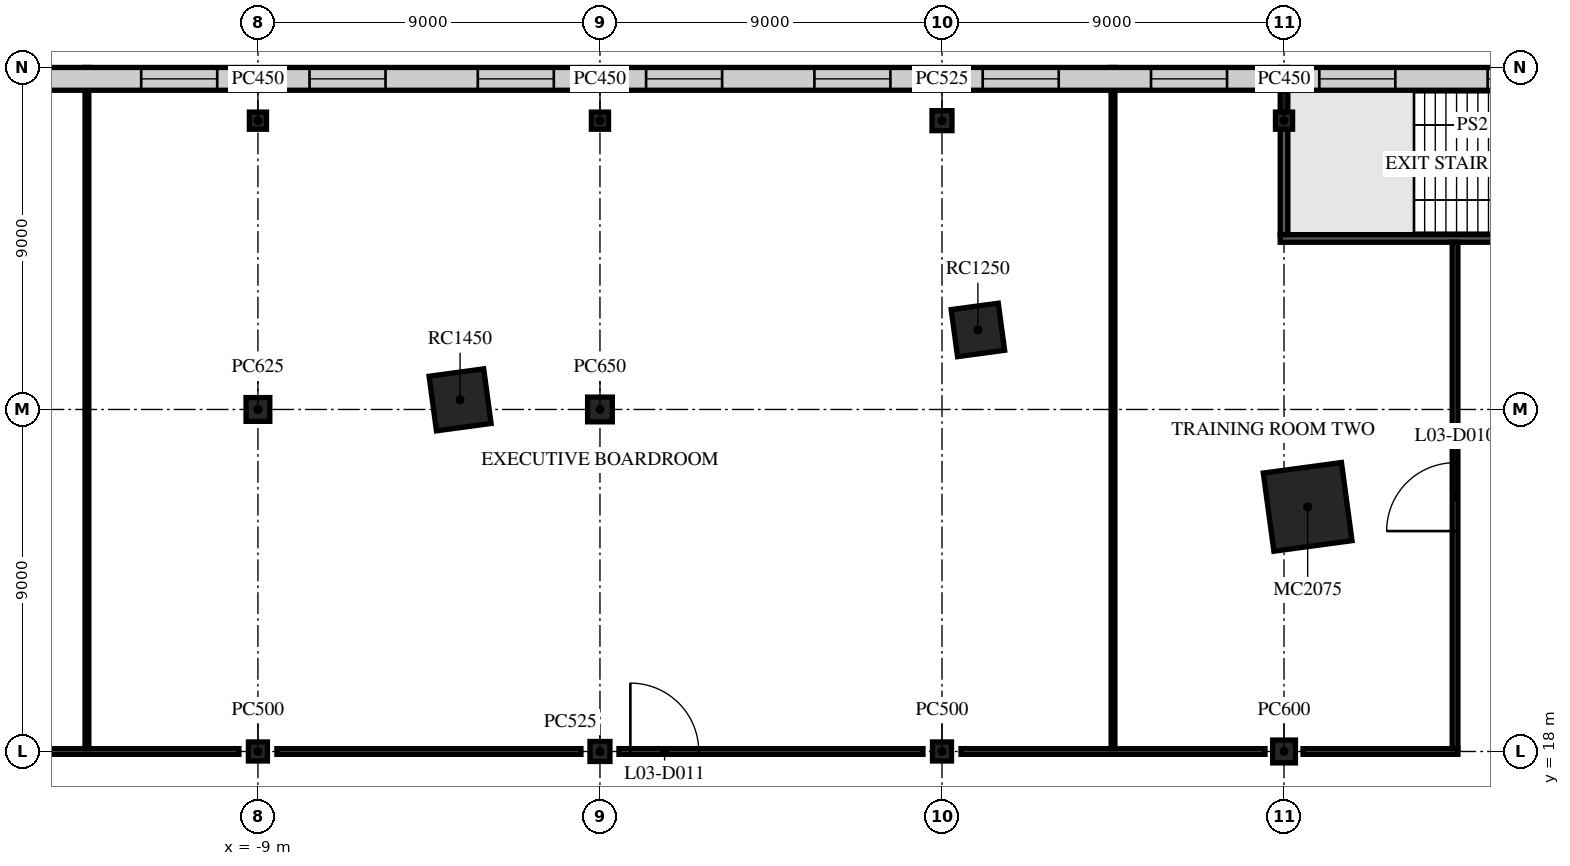
"""IFC4 building model, lengths in metres.
Left out: names, types, materials, properties, quantities, classifications, styles, units other than length and angle.
Written with IfcOpenShell. Run it as: python <this file> out.ifc"""

import sys

from ifc_helpers import new_model, si_unit, direction, frame, frame_2d, origin, origin_2d, place, context, subcontext, project, spatial, rectangle, extrude, element, fill, save


model = new_model("IFC4")
c1 = context("Model", 3, precision=1e-05, world=origin(), true_north=direction((0.0, 1.0)))
c2 = subcontext(c1, "Body", "Model", "MODEL_VIEW")
j1 = project(units=[si_unit("LENGTHUNIT", "METRE"), si_unit("PLANEANGLEUNIT", "RADIAN")], contexts=[c1])
p1 = place(None, origin())
s1 = spatial("IfcSite", under=j1, at=p1, CompositionType="ELEMENT")
p2 = place(p1, origin())
s2 = spatial("IfcBuilding", under=s1, at=p2, CompositionType="ELEMENT")
p3 = place(p2, frame((0.0, 0.0, 13.5)))
s3 = spatial("IfcBuildingStorey", under=s2, at=p3, CompositionType="ELEMENT", Elevation=13.5)
p4 = place(p3, frame((-9.0, 18.0, 0.0), z_axis=(0.0, 0.0, 1.0), x_axis=(1.0, 0.0, 0.0)))
e1 = element("IfcColumn", 1, at=p4, inside=s3, PredefinedType="COLUMN", context=c2, shape_type="SweptSolid", body=[
    extrude(rectangle(XDim=0.5, YDim=0.5, at=origin_2d()), origin(), (0.0, 0.0, 1.0), 4.5),
])
p5 = place(p3, frame((-9.0, 27.0, 0.0), z_axis=(0.0, 0.0, 1.0), x_axis=(1.0, 0.0, 0.0)))
e2 = element("IfcColumn", 2, at=p5, inside=s3, PredefinedType="COLUMN", context=c2, shape_type="SweptSolid", body=[
    extrude(rectangle(XDim=0.625, YDim=0.625, at=origin_2d()), origin(), (0.0, 0.0, 1.0), 4.5),
])
p6 = place(p3, frame((-9.0, 34.6, 0.0), z_axis=(0.0, 0.0, 1.0), x_axis=(1.0, 0.0, 0.0)))
e3 = element("IfcColumn", 3, at=p6, inside=s3, PredefinedType="COLUMN", context=c2, shape_type="SweptSolid", body=[
    extrude(rectangle(XDim=0.45, YDim=0.45, at=origin_2d()), origin(), (0.0, 0.0, 1.0), 4.5),
])
p7 = place(p3, frame((0.0, 18.0, 0.0), z_axis=(0.0, 0.0, 1.0), x_axis=(1.0, 0.0, 0.0)))
e4 = element("IfcColumn", 4, at=p7, inside=s3, PredefinedType="COLUMN", context=c2, shape_type="SweptSolid", body=[
    extrude(rectangle(XDim=0.525, YDim=0.525, at=origin_2d()), origin(), (0.0, 0.0, 1.0), 4.5),
])
p8 = place(p3, frame((0.0, 27.0, 0.0), z_axis=(0.0, 0.0, 1.0), x_axis=(1.0, 0.0, 0.0)))
e5 = element("IfcColumn", 5, at=p8, inside=s3, PredefinedType="COLUMN", context=c2, shape_type="SweptSolid", body=[
    extrude(rectangle(XDim=0.65, YDim=0.65, at=origin_2d()), origin(), (0.0, 0.0, 1.0), 4.5),
])
p9 = place(p3, frame((0.0, 34.6, 0.0), z_axis=(0.0, 0.0, 1.0), x_axis=(1.0, 0.0, 0.0)))
e6 = element("IfcColumn", 6, at=p9, inside=s3, PredefinedType="COLUMN", context=c2, shape_type="SweptSolid", body=[
    extrude(rectangle(XDim=0.45, YDim=0.45, at=origin_2d()), origin(), (0.0, 0.0, 1.0), 4.5),
])
p10 = place(p3, frame((9.0, 18.0, 0.0), z_axis=(0.0, 0.0, 1.0), x_axis=(1.0, 0.0, 0.0)))
e7 = element("IfcColumn", 7, at=p10, inside=s3, PredefinedType="COLUMN", context=c2, shape_type="SweptSolid", body=[
    extrude(rectangle(XDim=0.5, YDim=0.5, at=origin_2d()), origin(), (0.0, 0.0, 1.0), 4.5),
])
p11 = place(p3, frame((9.0, 34.6, 0.0), z_axis=(0.0, 0.0, 1.0), x_axis=(1.0, 0.0, 0.0)))
e8 = element("IfcColumn", 8, at=p11, inside=s3, PredefinedType="COLUMN", context=c2, shape_type="SweptSolid", body=[
    extrude(rectangle(XDim=0.525, YDim=0.525, at=origin_2d()), origin(), (0.0, 0.0, 1.0), 4.5),
])
p12 = place(p3, frame((18.0, 18.0, 0.0), z_axis=(0.0, 0.0, 1.0), x_axis=(1.0, 0.0, 0.0)))
e9 = element("IfcColumn", 9, at=p12, inside=s3, PredefinedType="COLUMN", context=c2, shape_type="SweptSolid", body=[
    extrude(rectangle(XDim=0.6, YDim=0.6, at=origin_2d()), origin(), (0.0, 0.0, 1.0), 4.5),
])
p13 = place(p3, frame((18.0, 34.6, 0.0), z_axis=(0.0, 0.0, 1.0), x_axis=(1.0, 0.0, 0.0)))
e10 = element("IfcColumn", 10, at=p13, inside=s3, PredefinedType="COLUMN", context=c2, shape_type="SweptSolid", body=[
    extrude(rectangle(XDim=0.45, YDim=0.45, at=origin_2d()), origin(), (0.0, 0.0, 1.0), 4.5),
])
p14 = place(p3, frame((18.622, 24.437, 0.0), z_axis=(0.0, 0.0, 1.0), x_axis=(0.991001197216, 0.133853005627, 0.0)))
e11 = element("IfcColumn", 11, at=p14, inside=s3, PredefinedType="COLUMN", context=c2, shape_type="SweptSolid", body=[
    extrude(rectangle(XDim=2.075, YDim=2.075, at=origin_2d()), origin(), (0.0, 0.0, 1.0), 4.5),
])
p15 = place(p3, frame((9.945, 29.093, 0.0), z_axis=(0.0, 0.0, 1.0), x_axis=(0.991001197216, 0.133853005627, 0.0)))
e12 = element("IfcColumn", 12, at=p15, inside=s3, PredefinedType="COLUMN", context=c2, shape_type="SweptSolid", body=[
    extrude(rectangle(XDim=1.25, YDim=1.25, at=origin_2d()), origin(), (0.0, 0.0, 1.0), 4.5),
])
p16 = place(p3, frame((-3.681, 27.253, 0.0), z_axis=(0.0, 0.0, 1.0), x_axis=(0.991001197216, 0.133853005627, 0.0)))
e13 = element("IfcColumn", 13, at=p16, inside=s3, PredefinedType="COLUMN", context=c2, shape_type="SweptSolid", body=[
    extrude(rectangle(XDim=1.45, YDim=1.45, at=origin_2d()), origin(), (0.0, 0.0, 1.0), 4.5),
])
for number, where, z_axis, x_axis in (
    (14, (-17.5, 18.0, 0.0), (0.0, 0.0, 1.0), (1.0, 0.0, 0.0)),
    (15, (-8.5, 18.0, 0.0), (0.0, 0.0, 1.0), (1.0, 0.0, 0.0)),
):
    element("IfcWall", number, at=place(p3, frame(where, z_axis=z_axis, x_axis=x_axis)), inside=s3, PredefinedType="PARTITIONING", context=c2, shape_type="SweptSolid", body=[
        extrude(rectangle(XDim=8.0, YDim=0.15, at=frame_2d((4.0, 0.0))), origin(), (0.0, 0.0, 1.0), 4.1),
    ])
p17 = place(p3, frame((0.5, 18.0, 0.0), z_axis=(0.0, 0.0, 1.0), x_axis=(1.0, 0.0, 0.0)))
e16 = element("IfcWall", 16, at=p17, inside=s3, PredefinedType="PARTITIONING", context=c2, shape_type="SweptSolid", body=[
    extrude(rectangle(XDim=8.0, YDim=0.15, at=frame_2d((4.0, 0.0))), origin(), (0.0, 0.0, 1.0), 4.1),
])
p18 = place(p17, frame((0.3, 0.0, 0.0)))
e17 = element("IfcOpeningElement", 17, at=p18, cuts=e16, PredefinedType="OPENING", context=c2, shape_type="SweptSolid", body=[
    extrude(rectangle(XDim=1.8, YDim=2.1, at=frame_2d((0.9, 1.05))), frame((0.0, 0.085, 0.0), z_axis=(0.0, -1.0, 0.0), x_axis=(1.0, 0.0, 0.0)), (0.0, 0.0, 1.0), 0.17),
])
p19 = place(p3, frame((9.5, 18.0, 0.0), z_axis=(0.0, 0.0, 1.0), x_axis=(1.0, 0.0, 0.0)))
e18 = element("IfcWall", 18, at=p19, inside=s3, PredefinedType="PARTITIONING", context=c2, shape_type="SweptSolid", body=[
    extrude(rectangle(XDim=8.0, YDim=0.15, at=frame_2d((4.0, 0.0))), origin(), (0.0, 0.0, 1.0), 4.1),
])
p20 = place(p3, frame((18.5, 18.0, 0.0), z_axis=(0.0, 0.0, 1.0), x_axis=(1.0, 0.0, 0.0)))
e19 = element("IfcWall", 19, at=p20, inside=s3, PredefinedType="PARTITIONING", context=c2, shape_type="SweptSolid", body=[
    extrude(rectangle(XDim=4.075, YDim=0.15, at=frame_2d((2.038, 0.0))), origin(), (0.0, 0.0, 1.0), 4.1),
])
p21 = place(p3, frame((17.9, 31.5, 0.0), z_axis=(0.0, 0.0, 1.0), x_axis=(1.0, 0.0, 0.0)))
e20 = element("IfcWall", 20, at=p21, inside=s3, PredefinedType="PARTITIONING", context=c2, shape_type="SweptSolid", body=[
    extrude(rectangle(XDim=9.175, YDim=0.2, at=frame_2d((4.587, 0.0))), origin(), (0.0, 0.0, 1.0), 4.1),
])
p22 = place(p21, frame((7.1, 0.0, 0.0)))
e21 = element("IfcOpeningElement", 21, at=p22, cuts=e20, PredefinedType="OPENING", context=c2, shape_type="SweptSolid", body=[
    extrude(rectangle(XDim=1.2, YDim=2.1, at=frame_2d((0.6, 1.05))), frame((0.0, 0.11, 0.0), z_axis=(0.0, -1.0, 0.0), x_axis=(1.0, 0.0, 0.0)), (0.0, 0.0, 1.0), 0.22),
])
for number, where, z_axis, x_axis in (
    (22, (-13.5, 18.075, 0.0), (0.0, 0.0, 1.0), (0.0, 1.0, 0.0)),
    (23, (13.5, 18.075, 0.0), (0.0, 0.0, 1.0), (0.0, 1.0, 0.0)),
):
    element("IfcWall", number, at=place(p3, frame(where, z_axis=z_axis, x_axis=x_axis)), inside=s3, PredefinedType="PARTITIONING", context=c2, shape_type="SweptSolid", body=[
        extrude(rectangle(XDim=17.925, YDim=0.1, at=frame_2d((8.962, 0.0))), origin(), (0.0, 0.0, 1.0), 4.1),
    ])
p23 = place(p3, frame((18.0, 31.6, 0.0), z_axis=(0.0, 0.0, 1.0), x_axis=(0.0, 1.0, 0.0)))
e24 = element("IfcWall", 24, at=p23, inside=s3, PredefinedType="PARTITIONING", context=c2, shape_type="SweptSolid", body=[
    extrude(rectangle(XDim=2.775, YDim=0.2, at=frame_2d((1.387, 0.0))), origin(), (0.0, 0.0, 1.0), 4.1),
])
p24 = place(p3, frame((18.0, 34.825, 0.0), z_axis=(0.0, 0.0, 1.0), x_axis=(0.0, 1.0, 0.0)))
e25 = element("IfcWall", 25, at=p24, inside=s3, PredefinedType="PARTITIONING", context=c2, shape_type="SweptSolid", body=[
    extrude(rectangle(XDim=1.175, YDim=0.2, at=frame_2d((0.587, 0.0))), origin(), (0.0, 0.0, 1.0), 4.1),
])
p25 = place(p3, frame((22.5, 18.075, 0.0), z_axis=(0.0, 0.0, 1.0), x_axis=(0.0, 1.0, 0.0)))
e26 = element("IfcWall", 26, at=p25, inside=s3, PredefinedType="PARTITIONING", context=c2, shape_type="SweptSolid", body=[
    extrude(rectangle(XDim=13.325, YDim=0.15, at=frame_2d((6.663, 0.0))), origin(), (0.0, 0.0, 1.0), 4.1),
])
p26 = place(p25, frame((5.725, 0.0, 0.0)))
e27 = element("IfcOpeningElement", 27, at=p26, cuts=e26, PredefinedType="OPENING", context=c2, shape_type="SweptSolid", body=[
    extrude(rectangle(XDim=1.8, YDim=2.1, at=frame_2d((0.9, 1.05))), frame((0.0, 0.085, 0.0), z_axis=(0.0, -1.0, 0.0), x_axis=(1.0, 0.0, 0.0)), (0.0, 0.0, 1.0), 0.17),
])
p27 = place(p3, frame((30.876, 35.7, 0.0), z_axis=(0.0, 0.0, 1.0), x_axis=(-1.0, 0.0, 0.0)))
e28 = element("IfcWall", 28, at=p27, inside=s3, PredefinedType="STANDARD", context=c2, shape_type="SweptSolid", body=[
    extrude(rectangle(XDim=61.751, YDim=0.6, at=frame_2d((30.876, 0.0))), origin(), (0.0, 0.0, 1.0), 4.1),
])
p28 = place(p27, frame((1.152, 0.0, 0.9)))
e29 = element("IfcOpeningElement", 29, at=p28, cuts=e28, PredefinedType="OPENING", context=c2, shape_type="SweptSolid", body=[
    extrude(rectangle(XDim=2.0, YDim=3.0, at=frame_2d((1.0, 1.5))), frame((0.0, 0.31, 0.0), z_axis=(0.0, -1.0, 0.0), x_axis=(1.0, 0.0, 0.0)), (0.0, 0.0, 1.0), 0.62),
])
p29 = place(p27, frame((5.519, 0.0, 0.9)))
e30 = element("IfcOpeningElement", 30, at=p29, cuts=e28, PredefinedType="OPENING", context=c2, shape_type="SweptSolid", body=[
    extrude(rectangle(XDim=2.0, YDim=3.0, at=frame_2d((1.0, 1.5))), frame((0.0, 0.31, 0.0), z_axis=(0.0, -1.0, 0.0), x_axis=(1.0, 0.0, 0.0)), (0.0, 0.0, 1.0), 0.62),
])
p30 = place(p27, frame((9.947, 0.0, 0.9)))
e31 = element("IfcOpeningElement", 31, at=p30, cuts=e28, PredefinedType="OPENING", context=c2, shape_type="SweptSolid", body=[
    extrude(rectangle(XDim=2.0, YDim=3.0, at=frame_2d((1.0, 1.5))), frame((0.0, 0.31, 0.0), z_axis=(0.0, -1.0, 0.0), x_axis=(1.0, 0.0, 0.0)), (0.0, 0.0, 1.0), 0.62),
])
p31 = place(p27, frame((14.376, 0.0, 0.9)))
e32 = element("IfcOpeningElement", 32, at=p31, cuts=e28, PredefinedType="OPENING", context=c2, shape_type="SweptSolid", body=[
    extrude(rectangle(XDim=2.0, YDim=3.0, at=frame_2d((1.0, 1.5))), frame((0.0, 0.31, 0.0), z_axis=(0.0, -1.0, 0.0), x_axis=(1.0, 0.0, 0.0)), (0.0, 0.0, 1.0), 0.62),
])
p32 = place(p27, frame((18.804, 0.0, 0.9)))
e33 = element("IfcOpeningElement", 33, at=p32, cuts=e28, PredefinedType="OPENING", context=c2, shape_type="SweptSolid", body=[
    extrude(rectangle(XDim=2.0, YDim=3.0, at=frame_2d((1.0, 1.5))), frame((0.0, 0.31, 0.0), z_axis=(0.0, -1.0, 0.0), x_axis=(1.0, 0.0, 0.0)), (0.0, 0.0, 1.0), 0.62),
])
p33 = place(p27, frame((23.233, 0.0, 0.9)))
e34 = element("IfcOpeningElement", 34, at=p33, cuts=e28, PredefinedType="OPENING", context=c2, shape_type="SweptSolid", body=[
    extrude(rectangle(XDim=2.0, YDim=3.0, at=frame_2d((1.0, 1.5))), frame((0.0, 0.31, 0.0), z_axis=(0.0, -1.0, 0.0), x_axis=(1.0, 0.0, 0.0)), (0.0, 0.0, 1.0), 0.62),
])
p34 = place(p27, frame((27.662, 0.0, 0.9)))
e35 = element("IfcOpeningElement", 35, at=p34, cuts=e28, PredefinedType="OPENING", context=c2, shape_type="SweptSolid", body=[
    extrude(rectangle(XDim=2.0, YDim=3.0, at=frame_2d((1.0, 1.5))), frame((0.0, 0.31, 0.0), z_axis=(0.0, -1.0, 0.0), x_axis=(1.0, 0.0, 0.0)), (0.0, 0.0, 1.0), 0.62),
])
p35 = place(p27, frame((32.09, 0.0, 0.9)))
e36 = element("IfcOpeningElement", 36, at=p35, cuts=e28, PredefinedType="OPENING", context=c2, shape_type="SweptSolid", body=[
    extrude(rectangle(XDim=2.0, YDim=3.0, at=frame_2d((1.0, 1.5))), frame((0.0, 0.31, 0.0), z_axis=(0.0, -1.0, 0.0), x_axis=(1.0, 0.0, 0.0)), (0.0, 0.0, 1.0), 0.62),
])
p36 = place(p27, frame((36.519, 0.0, 0.9)))
e37 = element("IfcOpeningElement", 37, at=p36, cuts=e28, PredefinedType="OPENING", context=c2, shape_type="SweptSolid", body=[
    extrude(rectangle(XDim=2.0, YDim=3.0, at=frame_2d((1.0, 1.5))), frame((0.0, 0.31, 0.0), z_axis=(0.0, -1.0, 0.0), x_axis=(1.0, 0.0, 0.0)), (0.0, 0.0, 1.0), 0.62),
])
p37 = place(p27, frame((40.947, 0.0, 0.9)))
e38 = element("IfcOpeningElement", 38, at=p37, cuts=e28, PredefinedType="OPENING", context=c2, shape_type="SweptSolid", body=[
    extrude(rectangle(XDim=2.0, YDim=3.0, at=frame_2d((1.0, 1.5))), frame((0.0, 0.31, 0.0), z_axis=(0.0, -1.0, 0.0), x_axis=(1.0, 0.0, 0.0)), (0.0, 0.0, 1.0), 0.62),
])
p38 = place(p27, frame((45.376, 0.0, 0.9)))
e39 = element("IfcOpeningElement", 39, at=p38, cuts=e28, PredefinedType="OPENING", context=c2, shape_type="SweptSolid", body=[
    extrude(rectangle(XDim=2.0, YDim=3.0, at=frame_2d((1.0, 1.5))), frame((0.0, 0.31, 0.0), z_axis=(0.0, -1.0, 0.0), x_axis=(1.0, 0.0, 0.0)), (0.0, 0.0, 1.0), 0.62),
])
p39 = place(p27, frame((49.804, 0.0, 0.9)))
e40 = element("IfcOpeningElement", 40, at=p39, cuts=e28, PredefinedType="OPENING", context=c2, shape_type="SweptSolid", body=[
    extrude(rectangle(XDim=2.0, YDim=3.0, at=frame_2d((1.0, 1.5))), frame((0.0, 0.31, 0.0), z_axis=(0.0, -1.0, 0.0), x_axis=(1.0, 0.0, 0.0)), (0.0, 0.0, 1.0), 0.62),
])
p40 = place(p27, frame((54.233, 0.0, 0.9)))
e41 = element("IfcOpeningElement", 41, at=p40, cuts=e28, PredefinedType="OPENING", context=c2, shape_type="SweptSolid", body=[
    extrude(rectangle(XDim=2.0, YDim=3.0, at=frame_2d((1.0, 1.5))), frame((0.0, 0.31, 0.0), z_axis=(0.0, -1.0, 0.0), x_axis=(1.0, 0.0, 0.0)), (0.0, 0.0, 1.0), 0.62),
])
p41 = place(p27, frame((58.599, 0.0, 0.9)))
e42 = element("IfcOpeningElement", 42, at=p41, cuts=e28, PredefinedType="OPENING", context=c2, shape_type="SweptSolid", body=[
    extrude(rectangle(XDim=2.0, YDim=3.0, at=frame_2d((1.0, 1.5))), frame((0.0, 0.31, 0.0), z_axis=(0.0, -1.0, 0.0), x_axis=(1.0, 0.0, 0.0)), (0.0, 0.0, 1.0), 0.62),
])
p42 = place(p26, origin())
e43 = element("IfcDoor", 43, at=p42, inside=s3, OperationType="DOUBLE_DOOR_SINGLE_SWING", PredefinedType="DOOR", context=c2, shape_type="SweptSolid", body=[
    extrude(rectangle(XDim=1.8, YDim=2.1, at=frame_2d((0.9, 1.05))), frame((0.0, 0.025, 0.0), z_axis=(0.0, -1.0, 0.0), x_axis=(1.0, 0.0, 0.0)), (0.0, 0.0, 1.0), 0.05),
])
fill(e27, e43)
p43 = place(p18, origin())
e44 = element("IfcDoor", 44, at=p43, inside=s3, OperationType="DOUBLE_DOOR_SINGLE_SWING", PredefinedType="DOOR", context=c2, shape_type="SweptSolid", body=[
    extrude(rectangle(XDim=1.8, YDim=2.1, at=frame_2d((0.9, 1.05))), frame((0.0, 0.025, 0.0), z_axis=(0.0, -1.0, 0.0), x_axis=(1.0, 0.0, 0.0)), (0.0, 0.0, 1.0), 0.05),
])
fill(e17, e44)
p44 = place(p29, origin())
e45 = element("IfcWindow", 45, at=p44, inside=s3, PartitioningType="SINGLE_PANEL", PredefinedType="WINDOW", context=c2, shape_type="SweptSolid", body=[
    extrude(rectangle(XDim=2.0, YDim=3.0, at=frame_2d((1.0, 1.5))), frame((0.0, 0.03, 0.0), z_axis=(0.0, -1.0, 0.0), x_axis=(1.0, 0.0, 0.0)), (0.0, 0.0, 1.0), 0.06),
])
fill(e30, e45)
p45 = place(p30, origin())
e46 = element("IfcWindow", 46, at=p45, inside=s3, PartitioningType="SINGLE_PANEL", PredefinedType="WINDOW", context=c2, shape_type="SweptSolid", body=[
    extrude(rectangle(XDim=2.0, YDim=3.0, at=frame_2d((1.0, 1.5))), frame((0.0, 0.03, 0.0), z_axis=(0.0, -1.0, 0.0), x_axis=(1.0, 0.0, 0.0)), (0.0, 0.0, 1.0), 0.06),
])
fill(e31, e46)
p46 = place(p31, origin())
e47 = element("IfcWindow", 47, at=p46, inside=s3, PartitioningType="SINGLE_PANEL", PredefinedType="WINDOW", context=c2, shape_type="SweptSolid", body=[
    extrude(rectangle(XDim=2.0, YDim=3.0, at=frame_2d((1.0, 1.5))), frame((0.0, 0.03, 0.0), z_axis=(0.0, -1.0, 0.0), x_axis=(1.0, 0.0, 0.0)), (0.0, 0.0, 1.0), 0.06),
])
fill(e32, e47)
p47 = place(p32, origin())
e48 = element("IfcWindow", 48, at=p47, inside=s3, PartitioningType="SINGLE_PANEL", PredefinedType="WINDOW", context=c2, shape_type="SweptSolid", body=[
    extrude(rectangle(XDim=2.0, YDim=3.0, at=frame_2d((1.0, 1.5))), frame((0.0, 0.03, 0.0), z_axis=(0.0, -1.0, 0.0), x_axis=(1.0, 0.0, 0.0)), (0.0, 0.0, 1.0), 0.06),
])
fill(e33, e48)
p48 = place(p33, origin())
e49 = element("IfcWindow", 49, at=p48, inside=s3, PartitioningType="SINGLE_PANEL", PredefinedType="WINDOW", context=c2, shape_type="SweptSolid", body=[
    extrude(rectangle(XDim=2.0, YDim=3.0, at=frame_2d((1.0, 1.5))), frame((0.0, 0.03, 0.0), z_axis=(0.0, -1.0, 0.0), x_axis=(1.0, 0.0, 0.0)), (0.0, 0.0, 1.0), 0.06),
])
fill(e34, e49)
p49 = place(p34, origin())
e50 = element("IfcWindow", 50, at=p49, inside=s3, PartitioningType="SINGLE_PANEL", PredefinedType="WINDOW", context=c2, shape_type="SweptSolid", body=[
    extrude(rectangle(XDim=2.0, YDim=3.0, at=frame_2d((1.0, 1.5))), frame((0.0, 0.03, 0.0), z_axis=(0.0, -1.0, 0.0), x_axis=(1.0, 0.0, 0.0)), (0.0, 0.0, 1.0), 0.06),
])
fill(e35, e50)
p50 = place(p35, origin())
e51 = element("IfcWindow", 51, at=p50, inside=s3, PartitioningType="SINGLE_PANEL", PredefinedType="WINDOW", context=c2, shape_type="SweptSolid", body=[
    extrude(rectangle(XDim=2.0, YDim=3.0, at=frame_2d((1.0, 1.5))), frame((0.0, 0.03, 0.0), z_axis=(0.0, -1.0, 0.0), x_axis=(1.0, 0.0, 0.0)), (0.0, 0.0, 1.0), 0.06),
])
fill(e36, e51)
p51 = place(p36, origin())
e52 = element("IfcWindow", 52, at=p51, inside=s3, PartitioningType="SINGLE_PANEL", PredefinedType="WINDOW", context=c2, shape_type="SweptSolid", body=[
    extrude(rectangle(XDim=2.0, YDim=3.0, at=frame_2d((1.0, 1.5))), frame((0.0, 0.03, 0.0), z_axis=(0.0, -1.0, 0.0), x_axis=(1.0, 0.0, 0.0)), (0.0, 0.0, 1.0), 0.06),
])
fill(e37, e52)
p52 = place(p37, origin())
e53 = element("IfcWindow", 53, at=p52, inside=s3, PartitioningType="SINGLE_PANEL", PredefinedType="WINDOW", context=c2, shape_type="SweptSolid", body=[
    extrude(rectangle(XDim=2.0, YDim=3.0, at=frame_2d((1.0, 1.5))), frame((0.0, 0.03, 0.0), z_axis=(0.0, -1.0, 0.0), x_axis=(1.0, 0.0, 0.0)), (0.0, 0.0, 1.0), 0.06),
])
fill(e38, e53)
save(model, sys.argv[1])
